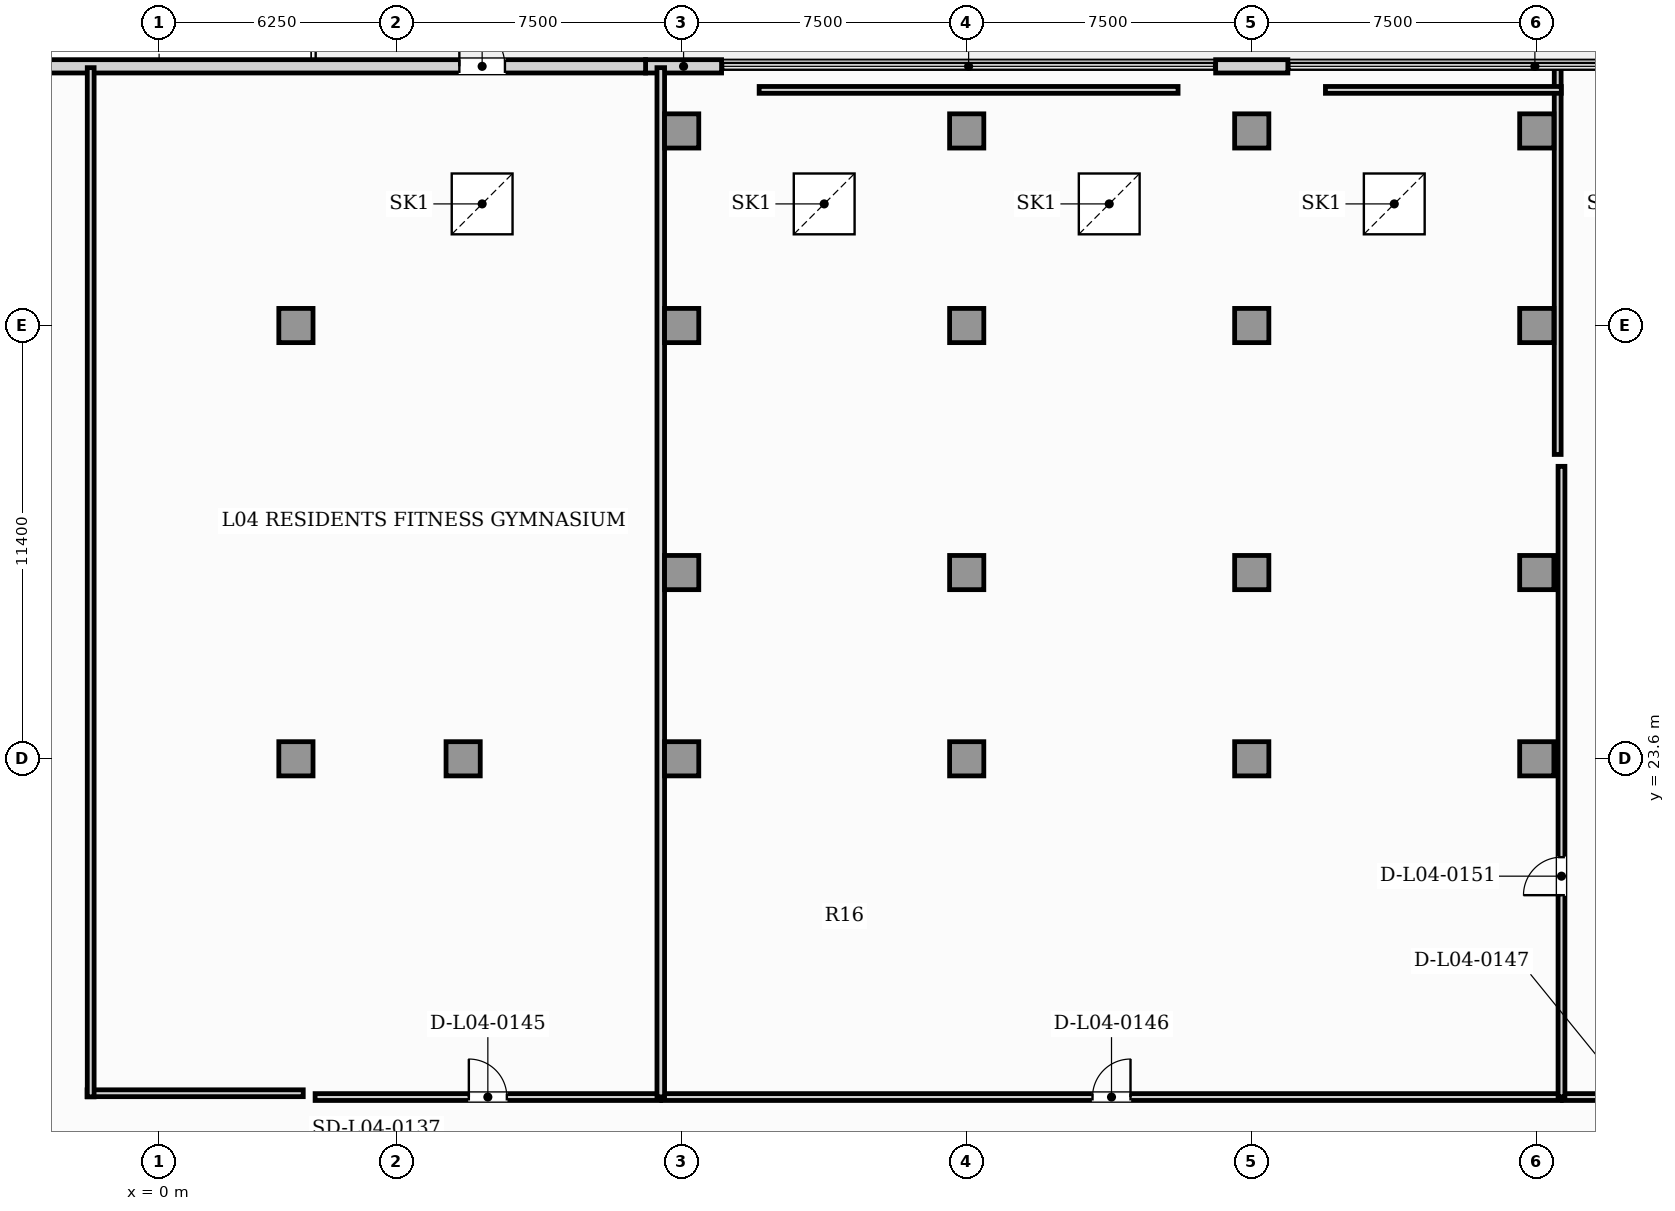
"""IFC4 building model, lengths in metres.
Left out: names, types, materials, properties, quantities, classifications, styles, units other than length and angle.
Written with IfcOpenShell. Run it as: python <this file> out.ifc"""

import sys

from ifc_helpers import new_model, si_unit, direction, frame, frame_2d, origin, origin_2d, place, context, subcontext, project, spatial, rectangle, extrude, element, fill, save


model = new_model("IFC4")
c1 = context("Model", 3, precision=1e-05, world=origin(), true_north=direction((0.0, 1.0)))
c2 = subcontext(c1, "Body", "Model", "MODEL_VIEW")
j1 = project(units=[si_unit("LENGTHUNIT", "METRE"), si_unit("PLANEANGLEUNIT", "RADIAN")], contexts=[c1])
p1 = place(None, origin())
s1 = spatial("IfcSite", under=j1, at=p1, CompositionType="ELEMENT")
p2 = place(p1, origin())
s2 = spatial("IfcBuilding", under=s1, at=p2, CompositionType="ELEMENT")
p3 = place(p2, frame((0.0, 0.0, 19.8)))
s3 = spatial("IfcBuildingStorey", under=s2, at=p3, CompositionType="ELEMENT", Elevation=19.8)
for number, where, z_axis, x_axis in (
    (1, (3.6, 23.6, 0.0), (0.0, 0.0, 1.0), (1.0, 0.0, 0.0)),
    (2, (3.6, 35.0, 0.0), (0.0, 0.0, 1.0), (1.0, 0.0, 0.0)),
    (3, (13.75, 23.6, 0.0), (0.0, 0.0, 1.0), (1.0, 0.0, 0.0)),
    (4, (13.75, 35.0, 0.0), (0.0, 0.0, 1.0), (1.0, 0.0, 0.0)),
    (5, (28.75, 23.6, 0.0), (0.0, 0.0, 1.0), (1.0, 0.0, 0.0)),
    (6, (28.75, 35.0, 0.0), (0.0, 0.0, 1.0), (1.0, 0.0, 0.0)),
    (7, (8.0, 23.6, 0.0), (0.0, 0.0, 1.0), (1.0, 0.0, 0.0)),
    (8, (21.25, 23.6, 0.0), (0.0, 0.0, 1.0), (1.0, 0.0, 0.0)),
    (9, (36.25, 23.6, 0.0), (0.0, 0.0, 1.0), (1.0, 0.0, 0.0)),
    (10, (13.75, 28.5, 0.0), (0.0, 0.0, 1.0), (1.0, 0.0, 0.0)),
    (11, (21.25, 28.5, 0.0), (0.0, 0.0, 1.0), (1.0, 0.0, 0.0)),
    (12, (28.75, 28.5, 0.0), (0.0, 0.0, 1.0), (1.0, 0.0, 0.0)),
    (13, (36.25, 28.5, 0.0), (0.0, 0.0, 1.0), (1.0, 0.0, 0.0)),
    (14, (21.25, 35.0, 0.0), (0.0, 0.0, 1.0), (1.0, 0.0, 0.0)),
    (15, (36.25, 35.0, 0.0), (0.0, 0.0, 1.0), (1.0, 0.0, 0.0)),
    (16, (13.75, 40.12, 0.0), (0.0, 0.0, 1.0), (1.0, 0.0, 0.0)),
    (17, (21.25, 40.12, 0.0), (0.0, 0.0, 1.0), (1.0, 0.0, 0.0)),
    (18, (28.75, 40.12, 0.0), (0.0, 0.0, 1.0), (1.0, 0.0, 0.0)),
    (19, (36.25, 40.12, 0.0), (0.0, 0.0, 1.0), (1.0, 0.0, 0.0)),
):
    element("IfcColumn", number, at=place(p3, frame(where, z_axis=z_axis, x_axis=x_axis)), inside=s3, PredefinedType="COLUMN", context=c2, shape_type="SweptSolid", body=[
        extrude(rectangle(XDim=0.9, YDim=0.9, at=origin_2d()), origin(), (0.0, 0.0, 1.0), 4.8),
    ])
p4 = place(p3, frame((12.8, 41.82, 0.0), z_axis=(0.0, 0.0, 1.0), x_axis=(1.0, 0.0, 0.0)))
e20 = element("IfcWall", 20, at=p4, inside=s3, PredefinedType="SOLIDWALL", context=c2, shape_type="SweptSolid", body=[
    extrude(rectangle(XDim=2.0, YDim=0.35, at=frame_2d((1.0, 0.0))), origin(), (0.0, 0.0, 1.0), 4.4),
])
p5 = place(p3, frame((27.8, 41.82, 0.0), z_axis=(0.0, 0.0, 1.0), x_axis=(1.0, 0.0, 0.0)))
e21 = element("IfcWall", 21, at=p5, inside=s3, PredefinedType="SOLIDWALL", context=c2, shape_type="SweptSolid", body=[
    extrude(rectangle(XDim=1.9, YDim=0.35, at=frame_2d((0.95, 0.0))), origin(), (0.0, 0.0, 1.0), 4.4),
])
p6 = place(p3, frame((-7.86, 41.82, 0.0), z_axis=(0.0, 0.0, 1.0), x_axis=(1.0, 0.0, 0.0)))
e22 = element("IfcWall", 22, at=p6, inside=s3, PredefinedType="SOLIDWALL", context=c2, shape_type="SweptSolid", body=[
    extrude(rectangle(XDim=20.66, YDim=0.35, at=frame_2d((10.33, 0.0))), origin(), (0.0, 0.0, 1.0), 4.4),
])
p7 = place(p6, frame((15.76, 0.0, 0.0)))
e23 = element("IfcOpeningElement", 23, at=p7, cuts=e22, PredefinedType="OPENING", context=c2, shape_type="SweptSolid", body=[
    extrude(rectangle(XDim=1.2, YDim=2.2, at=frame_2d((0.6, 1.1))), frame((0.0, 0.185, 0.0), z_axis=(0.0, -1.0, 0.0), x_axis=(1.0, 0.0, 0.0)), (0.0, 0.0, 1.0), 0.37),
])
p8 = place(p3, frame((4.105, 14.7, 0.0), z_axis=(0.0, 0.0, 1.0), x_axis=(1.0, 0.0, 0.0)))
e24 = element("IfcWall", 24, at=p8, inside=s3, PredefinedType="PARTITIONING", context=c2, shape_type="SweptSolid", body=[
    extrude(rectangle(XDim=9.09, YDim=0.18, at=frame_2d((4.545, 0.0))), origin(), (0.0, 0.0, 1.0), 4.4),
])
p9 = place(p8, frame((4.045, 0.0, 0.0)))
e25 = element("IfcOpeningElement", 25, at=p9, cuts=e24, PredefinedType="OPENING", context=c2, shape_type="SweptSolid", body=[
    extrude(rectangle(XDim=1.0, YDim=2.15, at=frame_2d((0.5, 1.075))), frame((0.0, 0.1, 0.0), z_axis=(0.0, -1.0, 0.0), x_axis=(1.0, 0.0, 0.0)), (0.0, 0.0, 1.0), 0.2),
])
p10 = place(p3, frame((13.225, 14.7, 0.0), z_axis=(0.0, 0.0, 1.0), x_axis=(1.0, 0.0, 0.0)))
e26 = element("IfcWall", 26, at=p10, inside=s3, PredefinedType="PARTITIONING", context=c2, shape_type="SweptSolid", body=[
    extrude(rectangle(XDim=23.67, YDim=0.18, at=frame_2d((11.835, 0.0))), origin(), (0.0, 0.0, 1.0), 4.4),
])
p11 = place(p10, frame((11.335, 0.0, 0.0)))
e27 = element("IfcOpeningElement", 27, at=p11, cuts=e26, PredefinedType="OPENING", context=c2, shape_type="SweptSolid", body=[
    extrude(rectangle(XDim=1.0, YDim=2.15, at=frame_2d((0.5, 1.075))), frame((0.0, 0.1, 0.0), z_axis=(0.0, -1.0, 0.0), x_axis=(1.0, 0.0, 0.0)), (0.0, 0.0, 1.0), 0.2),
])
p12 = place(p3, frame((36.925, 14.7, 0.0), z_axis=(0.0, 0.0, 1.0), x_axis=(1.0, 0.0, 0.0)))
e28 = element("IfcWall", 28, at=p12, inside=s3, PredefinedType="PARTITIONING", context=c2, shape_type="SweptSolid", body=[
    extrude(rectangle(XDim=3.57, YDim=0.18, at=frame_2d((1.785, 0.0))), origin(), (0.0, 0.0, 1.0), 4.4),
])
p13 = place(p12, frame((1.285, 0.0, 0.0)))
e29 = element("IfcOpeningElement", 29, at=p13, cuts=e28, PredefinedType="OPENING", context=c2, shape_type="SweptSolid", body=[
    extrude(rectangle(XDim=1.0, YDim=2.15, at=frame_2d((0.5, 1.075))), frame((0.0, 0.1, 0.0), z_axis=(0.0, -1.0, 0.0), x_axis=(1.0, 0.0, 0.0)), (0.0, 0.0, 1.0), 0.2),
])
p14 = place(p3, frame((13.2, 14.705, 0.0), z_axis=(0.0, 0.0, 1.0), x_axis=(0.0, 1.0, 0.0)))
e30 = element("IfcWall", 30, at=p14, inside=s3, PredefinedType="PARTITIONING", context=c2, shape_type="SweptSolid", body=[
    extrude(rectangle(XDim=27.08, YDim=0.2, at=frame_2d((13.54, 0.0))), origin(), (0.0, 0.0, 1.0), 4.4),
])
p15 = place(p3, frame((36.9, 14.705, 0.0), z_axis=(0.0, 0.0, 1.0), x_axis=(0.0, 1.0, 0.0)))
e31 = element("IfcWall", 31, at=p15, inside=s3, PredefinedType="PARTITIONING", context=c2, shape_type="SweptSolid", body=[
    extrude(rectangle(XDim=16.59, YDim=0.18, at=frame_2d((8.295, 0.0))), origin(), (0.0, 0.0, 1.0), 4.4),
])
p16 = place(p15, frame((5.306, 0.0, 0.0)))
e32 = element("IfcOpeningElement", 32, at=p16, cuts=e31, PredefinedType="OPENING", context=c2, shape_type="SweptSolid", body=[
    extrude(rectangle(XDim=1.0, YDim=2.15, at=frame_2d((0.5, 1.075))), frame((0.0, 0.1, 0.0), z_axis=(0.0, -1.0, 0.0), x_axis=(1.0, 0.0, 0.0)), (0.0, 0.0, 1.0), 0.2),
])
p17 = place(p3, frame((-1.895, 14.8, 0.0), z_axis=(0.0, 0.0, 1.0), x_axis=(1.0, 0.0, 0.0)))
e33 = element("IfcWall", 33, at=p17, inside=s3, PredefinedType="PARTITIONING", context=c2, shape_type="SweptSolid", body=[
    extrude(rectangle(XDim=5.688, YDim=0.18, at=frame_2d((2.844, 0.0))), origin(), (0.0, 0.0, 1.0), 4.4),
])
p18 = place(p3, frame((-1.8, 41.785, 0.0), z_axis=(0.0, 0.0, 1.0), x_axis=(0.0, -1.0, 0.0)))
e34 = element("IfcWall", 34, at=p18, inside=s3, PredefinedType="PARTITIONING", context=c2, shape_type="SweptSolid", body=[
    extrude(rectangle(XDim=27.08, YDim=0.18, at=frame_2d((13.54, 0.0))), origin(), (0.0, 0.0, 1.0), 4.4),
])
p19 = place(p3, frame((36.8, 31.607, 0.0), z_axis=(0.0, 0.0, 1.0), x_axis=(0.0, 1.0, 0.0)))
e35 = element("IfcWall", 35, at=p19, inside=s3, PredefinedType="PARTITIONING", context=c2, shape_type="SweptSolid", body=[
    extrude(rectangle(XDim=10.195, YDim=0.18, at=frame_2d((5.097, 0.0))), origin(), (0.0, 0.0, 1.0), 4.4),
])
p20 = place(p3, frame((36.895, 41.2, 0.0), z_axis=(0.0, 0.0, 1.0), x_axis=(-1.0, 0.0, 0.0)))
e36 = element("IfcWall", 36, at=p20, inside=s3, PredefinedType="PARTITIONING", context=c2, shape_type="SweptSolid", body=[
    extrude(rectangle(XDim=6.206, YDim=0.18, at=frame_2d((3.103, 0.0))), origin(), (0.0, 0.0, 1.0), 4.4),
])
p21 = place(p3, frame((26.811, 41.2, 0.0), z_axis=(0.0, 0.0, 1.0), x_axis=(-1.0, 0.0, 0.0)))
e37 = element("IfcWall", 37, at=p21, inside=s3, PredefinedType="PARTITIONING", context=c2, shape_type="SweptSolid", body=[
    extrude(rectangle(XDim=11.022, YDim=0.18, at=frame_2d((5.511, 0.0))), origin(), (0.0, 0.0, 1.0), 4.4),
])
p22 = place(p7, origin())
e38 = element("IfcDoor", 38, at=p22, inside=s3, OperationType="SINGLE_SWING_LEFT", PredefinedType="DOOR", context=c2, shape_type="SweptSolid", body=[
    extrude(rectangle(XDim=1.2, YDim=2.2, at=frame_2d((0.6, 1.1))), frame((0.0, 0.025, 0.0), z_axis=(0.0, -1.0, 0.0), x_axis=(1.0, 0.0, 0.0)), (0.0, 0.0, 1.0), 0.05),
])
fill(e23, e38)
p23 = place(p3, frame((0.0, 0.0, -0.3)))
p24 = place(p23, frame((8.5, 38.2, 0.25)))
e39 = element("IfcWindow", 39, at=p24, inside=s3, PartitioningType="SINGLE_PANEL", PredefinedType="SKYLIGHT", context=c2, shape_type="SweptSolid", body=[
    extrude(rectangle(XDim=1.6, YDim=1.6, at=origin_2d()), origin(), (0.0, 0.0, 1.0), 0.05),
])
p25 = place(p23, frame((17.5, 38.2, 0.25)))
e40 = element("IfcWindow", 40, at=p25, inside=s3, PartitioningType="SINGLE_PANEL", PredefinedType="SKYLIGHT", context=c2, shape_type="SweptSolid", body=[
    extrude(rectangle(XDim=1.6, YDim=1.6, at=origin_2d()), origin(), (0.0, 0.0, 1.0), 0.05),
])
p26 = place(p23, frame((25.0, 38.2, 0.25)))
e41 = element("IfcWindow", 41, at=p26, inside=s3, PartitioningType="SINGLE_PANEL", PredefinedType="SKYLIGHT", context=c2, shape_type="SweptSolid", body=[
    extrude(rectangle(XDim=1.6, YDim=1.6, at=origin_2d()), origin(), (0.0, 0.0, 1.0), 0.05),
])
p27 = place(p23, frame((32.5, 38.2, 0.25)))
e42 = element("IfcWindow", 42, at=p27, inside=s3, PartitioningType="SINGLE_PANEL", PredefinedType="SKYLIGHT", context=c2, shape_type="SweptSolid", body=[
    extrude(rectangle(XDim=1.6, YDim=1.6, at=origin_2d()), origin(), (0.0, 0.0, 1.0), 0.05),
])
p28 = place(p9, origin())
e43 = element("IfcDoor", 43, at=p28, inside=s3, OperationType="SINGLE_SWING_LEFT", PredefinedType="DOOR", context=c2, shape_type="SweptSolid", body=[
    extrude(rectangle(XDim=1.0, YDim=2.15, at=frame_2d((0.5, 1.075))), frame((0.0, 0.025, 0.0), z_axis=(0.0, -1.0, 0.0), x_axis=(1.0, 0.0, 0.0)), (0.0, 0.0, 1.0), 0.05),
])
fill(e25, e43)
p29 = place(p11, origin())
e44 = element("IfcDoor", 44, at=p29, inside=s3, OperationType="SINGLE_SWING_RIGHT", PredefinedType="DOOR", context=c2, shape_type="SweptSolid", body=[
    extrude(rectangle(XDim=1.0, YDim=2.15, at=frame_2d((0.5, 1.075))), frame((0.0, 0.025, 0.0), z_axis=(0.0, -1.0, 0.0), x_axis=(1.0, 0.0, 0.0)), (0.0, 0.0, 1.0), 0.05),
])
fill(e27, e44)
p30 = place(p16, origin())
e45 = element("IfcDoor", 45, at=p30, inside=s3, OperationType="SINGLE_SWING_LEFT", PredefinedType="DOOR", context=c2, shape_type="SweptSolid", body=[
    extrude(rectangle(XDim=1.0, YDim=2.15, at=frame_2d((0.5, 1.075))), frame((0.0, 0.025, 0.0), z_axis=(0.0, -1.0, 0.0), x_axis=(1.0, 0.0, 0.0)), (0.0, 0.0, 1.0), 0.05),
])
fill(e32, e45)
save(model, sys.argv[1])
